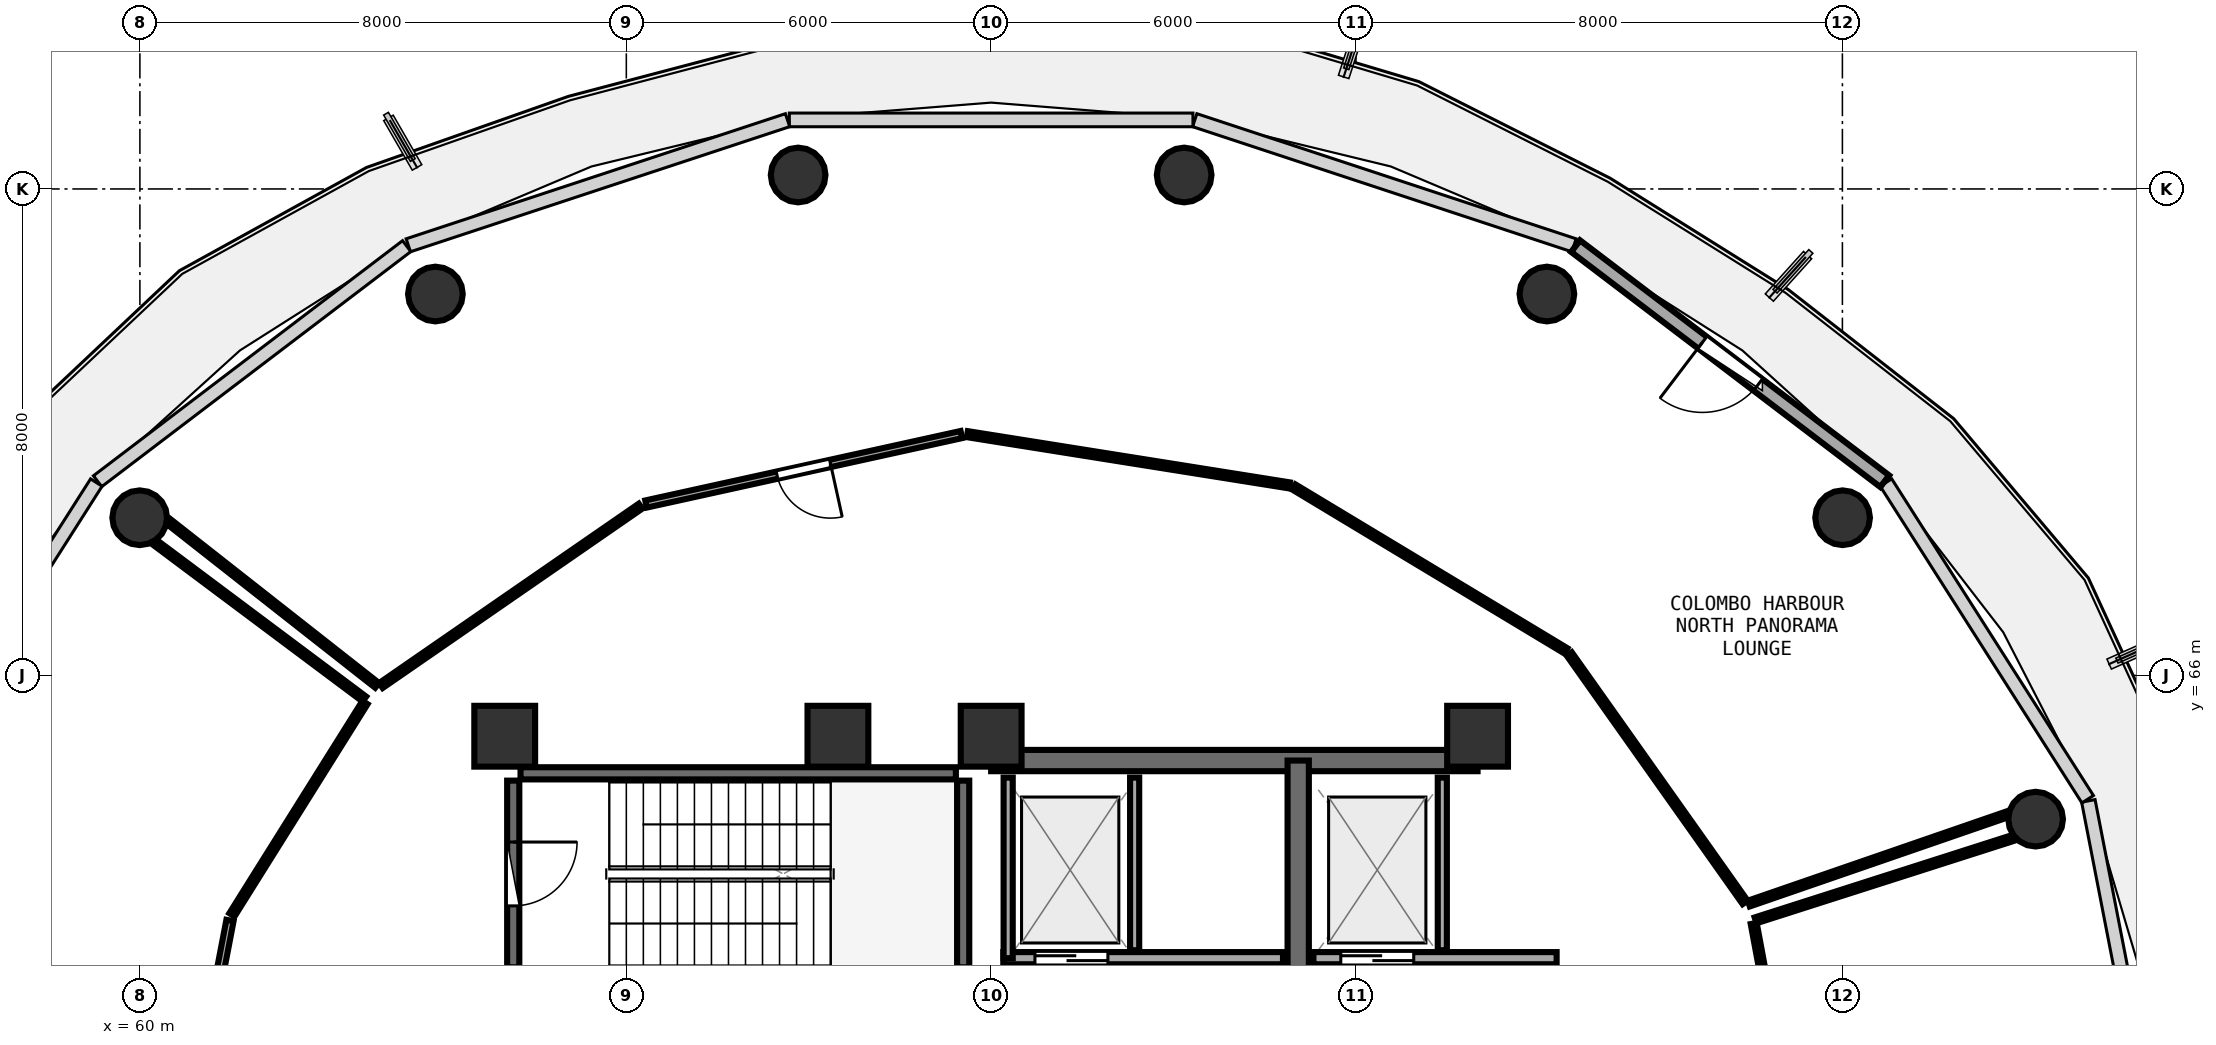
"""IFC4 building model, lengths in metres.
Left out: names, types, materials, properties, quantities, classifications, styles, units other than length and angle.
Written with IfcOpenShell. Run it as: python <this file> out.ifc"""

import sys

from ifc_helpers import new_model, si_unit, direction, frame, frame_2d, origin, origin_2d, place, context, subcontext, project, spatial, rectangle, circle, extrude, element, fill, save


model = new_model("IFC4")
c1 = context("Model", 3, precision=1e-05, world=origin(), true_north=direction((0.0, 1.0)))
c2 = subcontext(c1, "Body", "Model", "MODEL_VIEW")
j1 = project(units=[si_unit("LENGTHUNIT", "METRE"), si_unit("PLANEANGLEUNIT", "RADIAN")], contexts=[c1])
p1 = place(None, origin())
s1 = spatial("IfcSite", under=j1, at=p1, CompositionType="ELEMENT")
p2 = place(p1, origin())
s2 = spatial("IfcBuilding", under=s1, at=p2, CompositionType="ELEMENT")
p3 = place(p2, frame((0.0, 0.0, 293.7)))
s3 = spatial("IfcBuildingStorey", under=s2, at=p3, CompositionType="ELEMENT", Elevation=293.7)
for number, where, z_axis, x_axis in (
    (1, (82.0, 65.0, 0.0), (0.0, 0.0, 1.0), (1.0, 0.0, 0.0)),
    (2, (74.0, 65.0, 0.0), (0.0, 0.0, 1.0), (1.0, 0.0, 0.0)),
    (3, (71.48, 65.0, 0.0), (0.0, 0.0, 1.0), (1.0, 0.0, 0.0)),
    (4, (66.0, 65.0, 0.0), (0.0, 0.0, 1.0), (1.0, 0.0, 0.0)),
):
    element("IfcColumn", number, at=place(p3, frame(where, z_axis=z_axis, x_axis=x_axis)), inside=s3, PredefinedType="PILASTER", context=c2, shape_type="SweptSolid", body=[
        extrude(rectangle(XDim=1.0, YDim=1.0, at=origin_2d()), origin(), (0.0, 0.0, 1.0), 4.8),
    ])
for number, where, z_axis, x_axis in (
    (5, (91.177, 63.636, 0.0), (0.0, 0.0, 1.0), (1.0, 0.0, 0.0)),
    (6, (88.003, 68.593, 0.0), (0.0, 0.0, 1.0), (1.0, 0.0, 0.0)),
    (7, (83.14, 72.272, 0.0), (0.0, 0.0, 1.0), (1.0, 0.0, 0.0)),
    (8, (77.174, 74.229, 0.0), (0.0, 0.0, 1.0), (1.0, 0.0, 0.0)),
    (9, (70.826, 74.229, 0.0), (0.0, 0.0, 1.0), (1.0, 0.0, 0.0)),
    (10, (64.86, 72.272, 0.0), (0.0, 0.0, 1.0), (1.0, 0.0, 0.0)),
    (11, (59.997, 68.593, 0.0), (0.0, 0.0, 1.0), (1.0, 0.0, 0.0)),
):
    element("IfcColumn", number, at=place(p3, frame(where, z_axis=z_axis, x_axis=x_axis)), inside=s3, PredefinedType="COLUMN", context=c2, shape_type="SweptSolid", body=[
        extrude(circle(Radius=0.45, at=origin_2d()), origin(), (0.0, 0.0, 1.0), 4.8),
    ])
p4 = place(p3, frame((88.696, 69.194, 0.0), z_axis=(0.0, 0.0, 1.0), x_axis=(-0.796010444211, 0.605282886514, 0.0)))
e12 = element("IfcWall", 12, at=p4, inside=s3, PredefinedType="SOLIDWALL", context=c2, shape_type="SweptSolid", body=[
    extrude(rectangle(XDim=6.387, YDim=0.24, at=frame_2d((3.194, 0.0))), origin(), (0.0, 0.0, 1.0), 4.525),
])
p5 = place(p4, frame((2.619, 0.0, 0.0)))
e13 = element("IfcOpeningElement", 13, at=p5, cuts=e12, PredefinedType="OPENING", context=c2, shape_type="SweptSolid", body=[
    extrude(rectangle(XDim=1.15, YDim=2.15, at=frame_2d((0.575, 1.075))), frame((0.0, 0.13, 0.0), z_axis=(0.0, -1.0, 0.0), x_axis=(1.0, 0.0, 0.0)), (0.0, 0.0, 1.0), 0.26),
])
p6 = place(p3, frame((73.54, 61.2, 0.0), z_axis=(0.0, 0.0, 1.0), x_axis=(0.0, 1.0, 0.0)))
e14 = element("IfcWall", 14, at=p6, inside=s3, PredefinedType="SHEAR", context=c2, shape_type="SweptSolid", body=[
    extrude(rectangle(XDim=3.07, YDim=0.2, at=frame_2d((1.535, 0.0))), origin(), (0.0, 0.0, 1.0), 4.54),
])
p7 = place(p3, frame((73.42, 64.39, 0.0), z_axis=(0.0, 0.0, 1.0), x_axis=(-1.0, 0.0, 0.0)))
e15 = element("IfcWall", 15, at=p7, inside=s3, PredefinedType="SHEAR", context=c2, shape_type="SweptSolid", body=[
    extrude(rectangle(XDim=7.16, YDim=0.2, at=frame_2d((3.58, 0.0))), origin(), (0.0, 0.0, 1.0), 4.54),
])
p8 = place(p3, frame((66.14, 64.27, 0.0), z_axis=(0.0, 0.0, 1.0), x_axis=(0.0, -1.0, 0.0)))
e16 = element("IfcWall", 16, at=p8, inside=s3, PredefinedType="SHEAR", context=c2, shape_type="SweptSolid", body=[
    extrude(rectangle(XDim=3.07, YDim=0.2, at=frame_2d((1.535, 0.0))), origin(), (0.0, 0.0, 1.0), 4.54),
])
p9 = place(p8, frame((1.01, 0.0, 0.0)))
e17 = element("IfcOpeningElement", 17, at=p9, cuts=e16, PredefinedType="OPENING", context=c2, shape_type="SweptSolid", body=[
    extrude(rectangle(XDim=1.05, YDim=2.1, at=frame_2d((0.525, 1.05))), frame((0.0, 0.11, 0.0), z_axis=(0.0, -1.0, 0.0), x_axis=(1.0, 0.0, 0.0)), (0.0, 0.0, 1.0), 0.22),
])
p10 = place(p3, frame((74.0, 64.6, 0.0), z_axis=(0.0, 0.0, 1.0), x_axis=(1.0, 0.0, 0.0)))
e18 = element("IfcWall", 18, at=p10, inside=s3, PredefinedType="SHEAR", context=c2, shape_type="SweptSolid", body=[
    extrude(rectangle(XDim=8.0, YDim=0.35, at=frame_2d((4.0, 0.0))), origin(), (0.0, 0.0, 1.0), 4.54),
])
p11 = place(p3, frame((79.05, 58.3, 0.0), z_axis=(0.0, 0.0, 1.0), x_axis=(0.0, 1.0, 0.0)))
e19 = element("IfcWall", 19, at=p11, inside=s3, PredefinedType="SHEAR", context=c2, shape_type="SweptSolid", body=[
    extrude(rectangle(XDim=6.3, YDim=0.35, at=frame_2d((3.15, 0.0))), origin(), (0.0, 0.0, 1.0), 4.54),
])
p12 = place(p3, frame((74.2, 61.35, 0.0), z_axis=(0.0, 0.0, 1.0), x_axis=(1.0, 0.0, 0.0)))
e20 = element("IfcWall", 20, at=p12, inside=s3, PredefinedType="SOLIDWALL", context=c2, shape_type="SweptSolid", body=[
    extrude(rectangle(XDim=4.6, YDim=0.2, at=frame_2d((2.3, 0.0))), origin(), (0.0, 0.0, 1.0), 4.53),
])
p13 = place(p12, frame((0.52, 0.0, 0.0)))
e21 = element("IfcOpeningElement", 21, at=p13, cuts=e20, PredefinedType="OPENING", context=c2, shape_type="SweptSolid", body=[
    extrude(rectangle(XDim=1.2, YDim=2.15, at=frame_2d((0.6, 1.075))), frame((0.0, 0.11, 0.0), z_axis=(0.0, -1.0, 0.0), x_axis=(1.0, 0.0, 0.0)), (0.0, 0.0, 1.0), 0.22),
])
p14 = place(p3, frame((74.28, 61.35, 0.0), z_axis=(0.0, 0.0, 1.0), x_axis=(0.0, 1.0, 0.0)))
e22 = element("IfcWall", 22, at=p14, inside=s3, PredefinedType="PARTITIONING", context=c2, shape_type="SweptSolid", body=[
    extrude(rectangle(XDim=2.97, YDim=0.15, at=frame_2d((1.485, 0.0))), origin(), (0.0, 0.0, 1.0), 4.53),
])
p15 = place(p3, frame((76.36, 61.48, 0.0), z_axis=(0.0, 0.0, 1.0), x_axis=(0.0, 1.0, 0.0)))
e23 = element("IfcWall", 23, at=p15, inside=s3, PredefinedType="PARTITIONING", context=c2, shape_type="SweptSolid", body=[
    extrude(rectangle(XDim=2.84, YDim=0.15, at=frame_2d((1.42, 0.0))), origin(), (0.0, 0.0, 1.0), 4.53),
])
p16 = place(p3, frame((79.3, 61.35, 0.0), z_axis=(0.0, 0.0, 1.0), x_axis=(1.0, 0.0, 0.0)))
e24 = element("IfcWall", 24, at=p16, inside=s3, PredefinedType="SOLIDWALL", context=c2, shape_type="SweptSolid", body=[
    extrude(rectangle(XDim=4.0, YDim=0.2, at=frame_2d((2.0, 0.0))), origin(), (0.0, 0.0, 1.0), 3.825),
])
p17 = place(p16, frame((0.45, 0.0, 0.0)))
e25 = element("IfcOpeningElement", 25, at=p17, cuts=e24, PredefinedType="OPENING", context=c2, shape_type="SweptSolid", body=[
    extrude(rectangle(XDim=1.2, YDim=2.15, at=frame_2d((0.6, 1.075))), frame((0.0, 0.11, 0.0), z_axis=(0.0, -1.0, 0.0), x_axis=(1.0, 0.0, 0.0)), (0.0, 0.0, 1.0), 0.22),
])
p18 = place(p3, frame((81.42, 61.48, 0.0), z_axis=(0.0, 0.0, 1.0), x_axis=(0.0, 1.0, 0.0)))
e26 = element("IfcWall", 26, at=p18, inside=s3, PredefinedType="PARTITIONING", context=c2, shape_type="SweptSolid", body=[
    extrude(rectangle(XDim=2.84, YDim=0.15, at=frame_2d((1.42, 0.0))), origin(), (0.0, 0.0, 1.0), 4.53),
])
p19 = place(p3, frame((73.51, 69.961, 0.0), z_axis=(0.0, 0.0, 1.0), x_axis=(-0.976586737222, -0.215124021631, 0.0)))
e27 = element("IfcWall", 27, at=p19, inside=s3, PredefinedType="PARTITIONING", context=c2, shape_type="SweptSolid", body=[
    extrude(rectangle(XDim=5.31, YDim=0.12, at=frame_2d((2.655, 0.0))), origin(), (0.0, 0.0, 1.0), 2.525),
])
p20 = place(p19, frame((2.205, 0.0, 0.0)))
e28 = element("IfcOpeningElement", 28, at=p20, cuts=e27, PredefinedType="OPENING", context=c2, shape_type="SweptSolid", body=[
    extrude(rectangle(XDim=0.9, YDim=2.08, at=frame_2d((0.45, 1.04))), frame((0.0, 0.07, 0.0), z_axis=(0.0, -1.0, 0.0), x_axis=(1.0, 0.0, 0.0)), (0.0, 0.0, 1.0), 0.14),
])
p21 = place(p3, frame((61.482, 61.97, 0.0), z_axis=(0.0, 0.0, 1.0), x_axis=(-0.18843585457, -0.982085499696, 0.0)))
e29 = element("IfcWall", 29, at=p21, inside=s3, PredefinedType="PARTITIONING", context=c2, shape_type="SweptSolid", body=[
    extrude(rectangle(XDim=3.983, YDim=0.12, at=frame_2d((1.991, 0.0))), origin(), (0.0, 0.0, 1.0), 2.525),
])
p22 = place(p21, frame((1.541, 0.0, 0.0)))
e30 = element("IfcOpeningElement", 30, at=p22, cuts=e29, PredefinedType="OPENING", context=c2, shape_type="SweptSolid", body=[
    extrude(rectangle(XDim=0.9, YDim=2.08, at=frame_2d((0.45, 1.04))), frame((0.0, 0.07, 0.0), z_axis=(0.0, -1.0, 0.0), x_axis=(1.0, 0.0, 0.0)), (0.0, 0.0, 1.0), 0.14),
])
p23 = place(p3, frame((86.4, 62.268, 0.0), z_axis=(0.0, 0.0, 1.0), x_axis=(-0.577818362239, 0.81616538781, 0.0)))
e31 = element("IfcWall", 31, at=p23, inside=s3, PredefinedType="PARTITIONING", context=c2, shape_type="SweptSolid", body=[
    extrude(rectangle(XDim=5.005, YDim=0.1, at=frame_2d((2.502, 0.0))), origin(), (0.0, 0.0, 1.0), 2.525),
])
p24 = place(p3, frame((83.451, 66.406, 0.0), z_axis=(0.0, 0.0, 1.0), x_axis=(-0.856645727069, 0.515905125284, 0.0)))
e32 = element("IfcWall", 32, at=p24, inside=s3, PredefinedType="PARTITIONING", context=c2, shape_type="SweptSolid", body=[
    extrude(rectangle(XDim=5.22, YDim=0.1, at=frame_2d((2.61, 0.0))), origin(), (0.0, 0.0, 1.0), 2.525),
])
p25 = place(p3, frame((78.906, 69.125, 0.0), z_axis=(0.0, 0.0, 1.0), x_axis=(-0.987585923691, 0.15707973557, 0.0)))
e33 = element("IfcWall", 33, at=p25, inside=s3, PredefinedType="PARTITIONING", context=c2, shape_type="SweptSolid", body=[
    extrude(rectangle(XDim=5.364, YDim=0.1, at=frame_2d((2.682, 0.0))), origin(), (0.0, 0.0, 1.0), 2.525),
])
p26 = place(p3, frame((68.233, 68.783, 0.0), z_axis=(0.0, 0.0, 1.0), x_axis=(-0.822777954932, -0.568362944673, 0.0)))
e34 = element("IfcWall", 34, at=p26, inside=s3, PredefinedType="PARTITIONING", context=c2, shape_type="SweptSolid", body=[
    extrude(rectangle(XDim=5.188, YDim=0.1, at=frame_2d((2.594, 0.0))), origin(), (0.0, 0.0, 1.0), 2.525),
])
p27 = place(p3, frame((63.9, 65.837, 0.0), z_axis=(0.0, 0.0, 1.0), x_axis=(-0.786300871832, 0.617843782, 0.0)))
e35 = element("IfcWall", 35, at=p27, inside=s3, PredefinedType="PARTITIONING", context=c2, shape_type="SweptSolid", body=[
    extrude(rectangle(XDim=4.365, YDim=0.1, at=frame_2d((2.183, 0.0))), origin(), (0.0, 0.0, 1.0), 2.525),
])
p28 = place(p3, frame((90.709, 63.714, 0.0), z_axis=(0.0, 0.0, 1.0), x_axis=(-0.945295018754, -0.326216687984, 0.0)))
e36 = element("IfcWall", 36, at=p28, inside=s3, PredefinedType="PARTITIONING", context=c2, shape_type="SweptSolid", body=[
    extrude(rectangle(XDim=4.494, YDim=0.1, at=frame_2d((2.247, 0.0))), origin(), (0.0, 0.0, 1.0), 2.525),
])
p29 = place(p3, frame((63.702, 65.554, 0.0), z_axis=(0.0, 0.0, 1.0), x_axis=(-0.53099994336, -0.847371854708, 0.0)))
e37 = element("IfcWall", 37, at=p29, inside=s3, PredefinedType="PARTITIONING", context=c2, shape_type="SweptSolid", body=[
    extrude(rectangle(XDim=4.12, YDim=0.1, at=frame_2d((2.06, 0.0))), origin(), (0.0, 0.0, 1.0), 2.525),
])
p30 = place(p3, frame((60.245, 68.188, 0.0), z_axis=(0.0, 0.0, 1.0), x_axis=(0.800863986332, -0.598846286952, 0.0)))
e38 = element("IfcWall", 38, at=p30, inside=s3, PredefinedType="PARTITIONING", context=c2, shape_type="SweptSolid", body=[
    extrude(rectangle(XDim=4.302, YDim=0.1, at=frame_2d((2.151, 0.0))), origin(), (0.0, 0.0, 1.0), 2.525),
])
p31 = place(p3, frame((87.273, 57.99, 0.0), z_axis=(0.0, 0.0, 1.0), x_axis=(-0.182957331543, 0.983120854643, 0.0)))
e39 = element("IfcWall", 39, at=p31, inside=s3, PredefinedType="PARTITIONING", context=c2, shape_type="SweptSolid", body=[
    extrude(rectangle(XDim=3.998, YDim=0.1, at=frame_2d((1.999, 0.0))), origin(), (0.0, 0.0, 1.0), 2.525),
])
p32 = place(p3, frame((86.572, 61.972, 0.0), z_axis=(0.0, 0.0, 1.0), x_axis=(0.952449595941, 0.304696188345, 0.0)))
e40 = element("IfcWall", 40, at=p32, inside=s3, PredefinedType="PARTITIONING", context=c2, shape_type="SweptSolid", body=[
    extrude(rectangle(XDim=4.455, YDim=0.1, at=frame_2d((2.228, 0.0))), origin(), (0.0, 0.0, 1.0), 2.525),
])
p33 = place(p5, frame((1.15, 0.0, 0.0), z_axis=(0.0, 0.0, 1.0), x_axis=(-1.0, 0.0, 0.0)))
e41 = element("IfcDoor", 41, at=p33, inside=s3, OperationType="SINGLE_SWING_LEFT", PredefinedType="DOOR", context=c2, shape_type="SweptSolid", body=[
    extrude(rectangle(XDim=1.15, YDim=2.15, at=frame_2d((0.575, 1.075))), frame((0.0, 0.025, 0.0), z_axis=(0.0, -1.0, 0.0), x_axis=(1.0, 0.0, 0.0)), (0.0, 0.0, 1.0), 0.05),
])
fill(e13, e41)
p34 = place(p9, origin())
e42 = element("IfcDoor", 42, at=p34, inside=s3, OperationType="SINGLE_SWING_LEFT", PredefinedType="DOOR", context=c2, shape_type="SweptSolid", body=[
    extrude(rectangle(XDim=1.05, YDim=2.1, at=frame_2d((0.525, 1.05))), frame((0.0, 0.025, 0.0), z_axis=(0.0, -1.0, 0.0), x_axis=(1.0, 0.0, 0.0)), (0.0, 0.0, 1.0), 0.05),
])
fill(e17, e42)
p35 = place(p13, origin())
e43 = element("IfcDoor", 43, at=p35, inside=s3, OperationType="DOUBLE_DOOR_SLIDING", PredefinedType="DOOR", context=c2, shape_type="SweptSolid", body=[
    extrude(rectangle(XDim=1.2, YDim=2.15, at=frame_2d((0.6, 1.075))), frame((0.0, 0.025, 0.0), z_axis=(0.0, -1.0, 0.0), x_axis=(1.0, 0.0, 0.0)), (0.0, 0.0, 1.0), 0.05),
])
fill(e21, e43)
p36 = place(p17, origin())
e44 = element("IfcDoor", 44, at=p36, inside=s3, OperationType="DOUBLE_DOOR_SLIDING", PredefinedType="DOOR", context=c2, shape_type="SweptSolid", body=[
    extrude(rectangle(XDim=1.2, YDim=2.15, at=frame_2d((0.6, 1.075))), frame((0.0, 0.025, 0.0), z_axis=(0.0, -1.0, 0.0), x_axis=(1.0, 0.0, 0.0)), (0.0, 0.0, 1.0), 0.05),
])
fill(e25, e44)
p37 = place(p20, origin())
e45 = element("IfcDoor", 45, at=p37, inside=s3, OperationType="SINGLE_SWING_LEFT", PredefinedType="DOOR", context=c2, shape_type="SweptSolid", body=[
    extrude(rectangle(XDim=0.9, YDim=2.08, at=frame_2d((0.45, 1.04))), frame((0.0, 0.025, 0.0), z_axis=(0.0, -1.0, 0.0), x_axis=(1.0, 0.0, 0.0)), (0.0, 0.0, 1.0), 0.05),
])
fill(e28, e45)
save(model, sys.argv[1])
